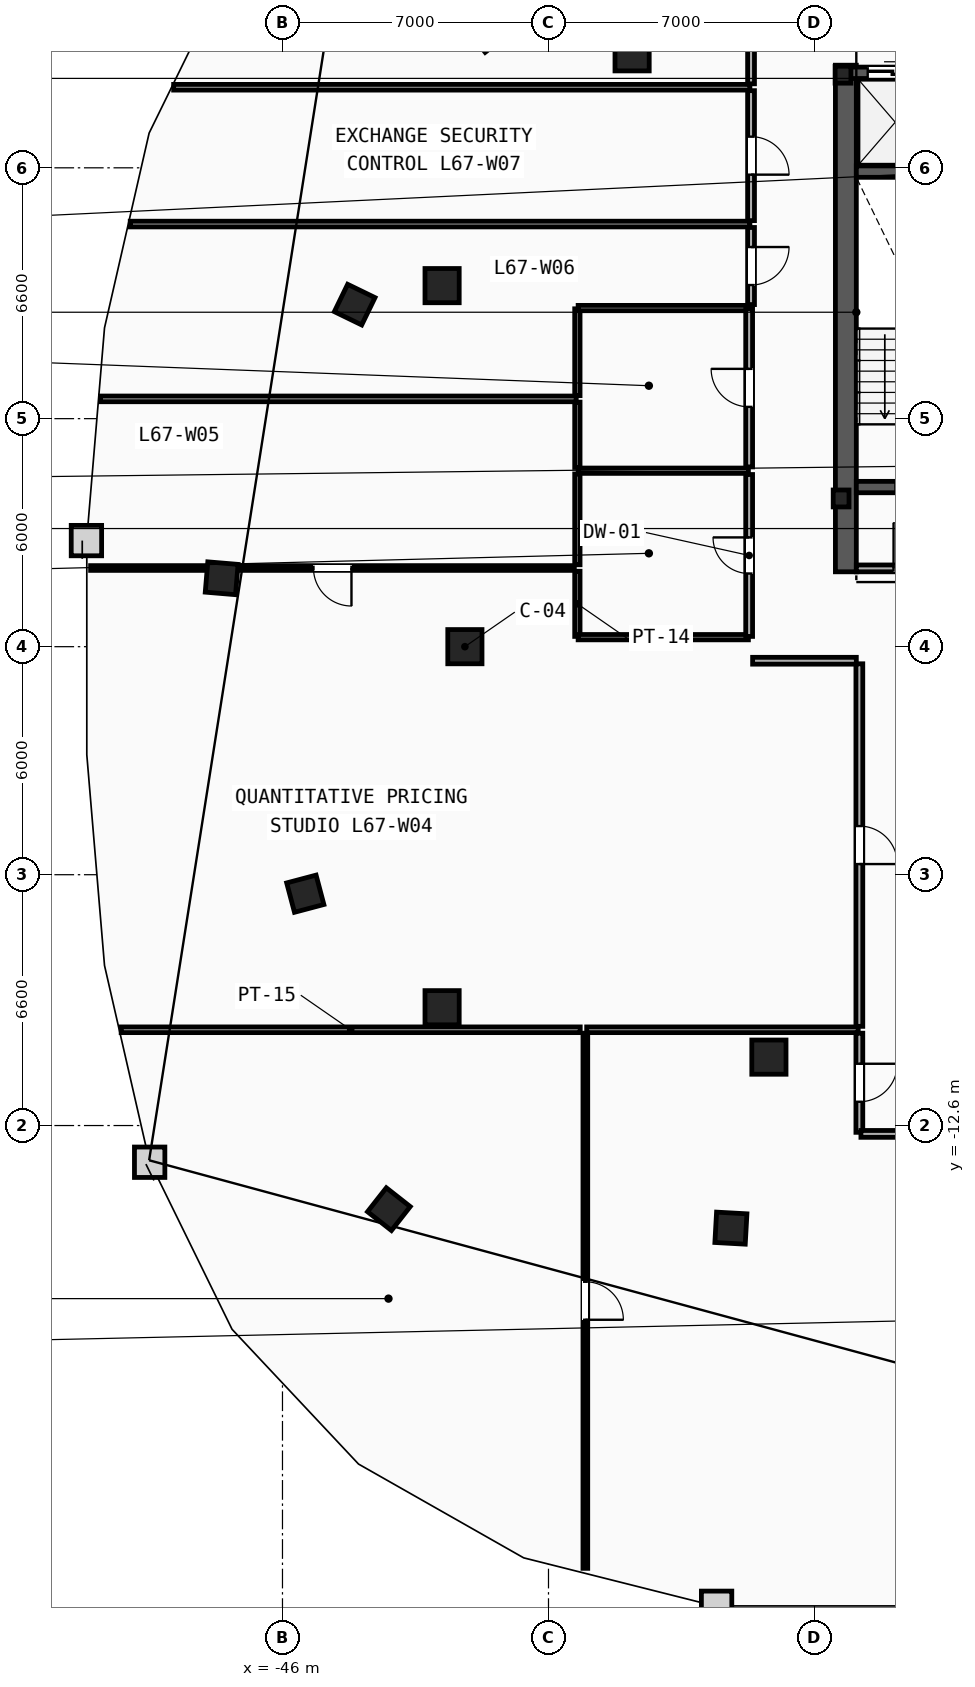
"""IFC4 building model, lengths in metres.
Left out: names, types, materials, properties, quantities, classifications, styles, units other than length and angle.
Written with IfcOpenShell. Run it as: python <this file> out.ifc"""

import sys

from ifc_helpers import new_model, si_unit, direction, frame, frame_2d, origin, origin_2d, place, context, subcontext, project, spatial, rectangle, i_section, extrude, element, fill, save


model = new_model("IFC4")
c1 = context("Model", 3, precision=1e-05, world=origin(), true_north=direction((0.0, 1.0)))
c2 = subcontext(c1, "Body", "Model", "MODEL_VIEW")
j1 = project(units=[si_unit("LENGTHUNIT", "METRE"), si_unit("PLANEANGLEUNIT", "RADIAN")], contexts=[c1])
p1 = place(None, origin())
s1 = spatial("IfcSite", under=j1, at=p1, CompositionType="ELEMENT")
p2 = place(p1, origin())
s2 = spatial("IfcBuilding", under=s1, at=p2, CompositionType="ELEMENT")
p3 = place(p2, frame((0.0, 0.0, 254.0)))
s3 = spatial("IfcBuildingStorey", under=s2, at=p3, CompositionType="ELEMENT", Elevation=254.0)
for number, where, z_axis, x_axis in (
    (1, (-31.3, 3.9, 0.0), (0.0, 0.0, 1.0), (1.0, 0.0, 0.0)),
    (2, (-31.25, 15.05, 0.0), (0.0, 0.0, 1.0), (1.0, 0.0, 0.0)),
):
    element("IfcColumn", number, at=place(p3, frame(where, z_axis=z_axis, x_axis=x_axis)), inside=s3, PredefinedType="COLUMN", context=c2, shape_type="SweptSolid", body=[
        extrude(i_section(OverallWidth=0.416, OverallDepth=0.446, WebThickness=0.039, FlangeThickness=0.063, FilletRadius=0.018, at=origin_2d()), origin(), (0.0, 0.0, 1.0), 3.6),
    ])
for number, where, z_axis, x_axis in (
    (3, (-41.2, 0.0, 0.0), (0.0, 0.0, 1.0), (1.0, 0.0, 0.0)),
    (4, (-41.8, 9.5, 0.0), (0.0, 0.0, 1.0), (1.0, 0.0, 0.0)),
    (5, (-36.8, 15.6, 0.0), (0.0, 0.0, 1.0), (1.0, 0.0, 0.0)),
    (6, (-41.8, -9.5, 0.0), (0.0, 0.0, 1.0), (1.0, 0.0, 0.0)),
    (7, (-33.2, -10.8, 0.0), (0.0, 0.0, 1.0), (1.0, 0.0, 0.0)),
):
    element("IfcColumn", number, at=place(p3, frame(where, z_axis=z_axis, x_axis=x_axis)), inside=s3, PredefinedType="COLUMN", context=c2, shape_type="SweptSolid", body=[
        extrude(rectangle(XDim=0.9, YDim=0.9, at=origin_2d()), origin(), (0.0, 0.0, 1.0), 3.6),
    ])
for number, where, z_axis, x_axis in (
    (8, (-40.6, 16.2, 0.0), (0.0, 0.0, 1.0), (-0.785, -0.619, 0.0)),
    (9, (-44.1, 9.0, 0.0), (0.0, 0.0, 1.0), (-0.437, -0.899, 0.0)),
    (10, (-47.6, 1.8, 0.0), (0.0, 0.0, 1.0), (-0.084, -0.997, 0.0)),
    (11, (-45.4, -6.5, 0.0), (0.0, 0.0, 1.0), (0.256, -0.967, 0.0)),
    (12, (-43.2, -14.8, 0.0), (0.0, 0.0, 1.0), (0.786, -0.618, 0.0)),
    (13, (-34.2, -15.3, 0.0), (0.0, 0.0, 1.0), (0.998, -0.055, 0.0)),
):
    element("IfcColumn", number, at=place(p3, frame(where, z_axis=z_axis, x_axis=x_axis)), inside=s3, PredefinedType="COLUMN", context=c2, shape_type="SweptSolid", body=[
        extrude(rectangle(XDim=0.8, YDim=0.8, at=origin_2d()), origin(), (0.0, 0.0, 1.0), 3.6),
    ])
p4 = place(p3, frame((-31.175, 1.97, 0.0), z_axis=(0.0, 0.0, 1.0), x_axis=(0.0, 1.0, 0.0)))
e14 = element("IfcWall", 14, at=p4, inside=s3, PredefinedType="SHEAR", context=c2, shape_type="SweptSolid", body=[
    extrude(rectangle(XDim=13.33, YDim=0.55, at=frame_2d((6.665, 0.0))), origin(), (0.0, 0.0, 1.0), 3.34),
])
p5 = place(p3, frame((-30.9, 4.2, 0.0), z_axis=(0.0, 0.0, 1.0), x_axis=(1.0, 0.0, 0.0)))
e15 = element("IfcWall", 15, at=p5, inside=s3, PredefinedType="SHEAR", context=c2, shape_type="SweptSolid", body=[
    extrude(rectangle(XDim=3.16, YDim=0.3, at=frame_2d((1.58, 0.0))), origin(), (0.0, 0.0, 1.0), 3.34),
])
p6 = place(p5, frame((1.03, 0.0, 0.0)))
e16 = element("IfcOpeningElement", 16, at=p6, cuts=e15, PredefinedType="OPENING", context=c2, shape_type="SweptSolid", body=[
    extrude(rectangle(XDim=1.1, YDim=2.15, at=frame_2d((0.55, 1.075))), frame((0.0, 0.16, 0.0), z_axis=(0.0, -1.0, 0.0), x_axis=(1.0, 0.0, 0.0)), (0.0, 0.0, 1.0), 0.32),
])
p7 = place(p3, frame((-30.9, 12.5, 0.0), z_axis=(0.0, 0.0, 1.0), x_axis=(1.0, 0.0, 0.0)))
e17 = element("IfcWall", 17, at=p7, inside=s3, PredefinedType="SHEAR", context=c2, shape_type="SweptSolid", body=[
    extrude(rectangle(XDim=3.16, YDim=0.3, at=frame_2d((1.58, 0.0))), origin(), (0.0, 0.0, 1.0), 3.34),
])
p8 = place(p3, frame((-30.9, 2.06, 0.0), z_axis=(0.0, 0.0, 1.0), x_axis=(1.0, 0.0, 0.0)))
e18 = element("IfcWall", 18, at=p8, inside=s3, PredefinedType="PARTITIONING", context=c2, shape_type="SweptSolid", body=[
    extrude(rectangle(XDim=3.16, YDim=0.18, at=frame_2d((1.58, 0.0))), origin(), (0.0, 0.0, 1.0), 3.34),
])
p9 = place(p8, frame((0.98, 0.0, 0.0)))
e19 = element("IfcOpeningElement", 19, at=p9, cuts=e18, PredefinedType="OPENING", context=c2, shape_type="SweptSolid", body=[
    extrude(rectangle(XDim=1.2, YDim=2.15, at=frame_2d((0.6, 1.075))), frame((0.0, 0.1, 0.0), z_axis=(0.0, -1.0, 0.0), x_axis=(1.0, 0.0, 0.0)), (0.0, 0.0, 1.0), 0.2),
])
p10 = place(p3, frame((-31.2, 15.1, 0.0), z_axis=(0.0, 0.0, 1.0), x_axis=(1.0, 0.0, 0.0)))
e20 = element("IfcWall", 20, at=p10, inside=s3, PredefinedType="SHEAR", context=c2, shape_type="SweptSolid", body=[
    extrude(rectangle(XDim=2.5, YDim=0.3, at=frame_2d((1.25, 0.0))), origin(), (0.0, 0.0, 1.0), 3.34),
])
p11 = place(p10, frame((0.6, 0.0, 0.0)))
e21 = element("IfcOpeningElement", 21, at=p11, cuts=e20, PredefinedType="OPENING", context=c2, shape_type="SweptSolid", body=[
    extrude(rectangle(XDim=1.3, YDim=2.2, at=frame_2d((0.65, 1.1))), frame((0.0, 0.16, 0.0), z_axis=(0.0, -1.0, 0.0), x_axis=(1.0, 0.0, 0.0)), (0.0, 0.0, 1.0), 0.32),
])
p12 = place(p3, frame((-38.24, 0.27, 0.0), z_axis=(0.0, 0.0, 1.0), x_axis=(0.0, 1.0, 0.0)))
e22 = element("IfcWall", 22, at=p12, inside=s3, PredefinedType="PARTITIONING", context=c2, shape_type="SweptSolid", body=[
    extrude(rectangle(XDim=1.715, YDim=0.14, at=frame_2d((0.857, 0.0))), origin(), (0.0, 0.0, 1.0), 3.34),
])
p13 = place(p3, frame((-38.24, 2.155, 0.0), z_axis=(0.0, 0.0, 1.0), x_axis=(0.0, 1.0, 0.0)))
e23 = element("IfcWall", 23, at=p13, inside=s3, PredefinedType="PARTITIONING", context=c2, shape_type="SweptSolid", body=[
    extrude(rectangle(XDim=2.39, YDim=0.14, at=frame_2d((1.195, 0.0))), origin(), (0.0, 0.0, 1.0), 3.34),
])
p14 = place(p3, frame((-38.24, 4.715, 0.0), z_axis=(0.0, 0.0, 1.0), x_axis=(0.0, 1.0, 0.0)))
e24 = element("IfcWall", 24, at=p14, inside=s3, PredefinedType="PARTITIONING", context=c2, shape_type="SweptSolid", body=[
    extrude(rectangle(XDim=1.72, YDim=0.14, at=frame_2d((0.86, 0.0))), origin(), (0.0, 0.0, 1.0), 3.34),
])
p15 = place(p3, frame((-38.24, 6.605, 0.0), z_axis=(0.0, 0.0, 1.0), x_axis=(0.0, 1.0, 0.0)))
e25 = element("IfcWall", 25, at=p15, inside=s3, PredefinedType="PARTITIONING", context=c2, shape_type="SweptSolid", body=[
    extrude(rectangle(XDim=2.285, YDim=0.14, at=frame_2d((1.143, 0.0))), origin(), (0.0, 0.0, 1.0), 3.34),
])
for number, where, z_axis, x_axis in (
    (26, (-38.22, 0.25, 0.0), (0.0, 0.0, 1.0), (1.0, 0.0, 0.0)),
    (27, (-38.22, 4.63, 0.0), (0.0, 0.0, 1.0), (1.0, 0.0, 0.0)),
    (28, (-38.22, 8.91, 0.0), (0.0, 0.0, 1.0), (1.0, 0.0, 0.0)),
):
    element("IfcWall", number, at=place(p3, frame(where, z_axis=z_axis, x_axis=x_axis)), inside=s3, PredefinedType="PARTITIONING", context=c2, shape_type="SweptSolid", body=[
        extrude(rectangle(XDim=4.48, YDim=0.14, at=frame_2d((2.24, 0.0))), origin(), (0.0, 0.0, 1.0), 3.34),
    ])
p16 = place(p3, frame((-33.72, 0.27, 0.0), z_axis=(0.0, 0.0, 1.0), x_axis=(0.0, 1.0, 0.0)))
e29 = element("IfcWall", 29, at=p16, inside=s3, PredefinedType="PARTITIONING", context=c2, shape_type="SweptSolid", body=[
    extrude(rectangle(XDim=4.26, YDim=0.18, at=frame_2d((2.13, 0.0))), origin(), (0.0, 0.0, 1.0), 3.34),
])
p17 = place(p16, frame((1.655, 0.0, 0.0)))
e30 = element("IfcOpeningElement", 30, at=p17, cuts=e29, PredefinedType="OPENING", context=c2, shape_type="SweptSolid", body=[
    extrude(rectangle(XDim=0.95, YDim=2.1, at=frame_2d((0.475, 1.05))), frame((0.0, 0.1, 0.0), z_axis=(0.0, -1.0, 0.0), x_axis=(1.0, 0.0, 0.0)), (0.0, 0.0, 1.0), 0.2),
])
p18 = place(p3, frame((-33.72, 4.73, 0.0), z_axis=(0.0, 0.0, 1.0), x_axis=(0.0, 1.0, 0.0)))
e31 = element("IfcWall", 31, at=p18, inside=s3, PredefinedType="PARTITIONING", context=c2, shape_type="SweptSolid", body=[
    extrude(rectangle(XDim=4.16, YDim=0.18, at=frame_2d((2.08, 0.0))), origin(), (0.0, 0.0, 1.0), 3.34),
])
p19 = place(p18, frame((1.58, 0.0, 0.0)))
e32 = element("IfcOpeningElement", 32, at=p19, cuts=e31, PredefinedType="OPENING", context=c2, shape_type="SweptSolid", body=[
    extrude(rectangle(XDim=1.0, YDim=2.15, at=frame_2d((0.5, 1.075))), frame((0.0, 0.1, 0.0), z_axis=(0.0, -1.0, 0.0), x_axis=(1.0, 0.0, 0.0)), (0.0, 0.0, 1.0), 0.2),
])
p20 = place(p3, frame((-50.245, -10.08, 0.0), z_axis=(0.0, 0.0, 1.0), x_axis=(1.0, 0.0, 0.0)))
e33 = element("IfcWall", 33, at=p20, inside=s3, PredefinedType="PARTITIONING", context=c2, shape_type="SweptSolid", body=[
    extrude(rectangle(XDim=12.08, YDim=0.15, at=frame_2d((6.04, 0.0))), origin(), (0.0, 0.0, 1.0), 2.724),
])
p21 = place(p3, frame((-37.995, -10.08, 0.0), z_axis=(0.0, 0.0, 1.0), x_axis=(1.0, 0.0, 0.0)))
e34 = element("IfcWall", 34, at=p21, inside=s3, PredefinedType="PARTITIONING", context=c2, shape_type="SweptSolid", body=[
    extrude(rectangle(XDim=7.145, YDim=0.15, at=frame_2d((3.573, 0.0))), origin(), (0.0, 0.0, 1.0), 2.724),
])
p22 = place(p3, frame((-50.79, 6.52, 0.0), z_axis=(0.0, 0.0, 1.0), x_axis=(1.0, 0.0, 0.0)))
e35 = element("IfcWall", 35, at=p22, inside=s3, PredefinedType="PARTITIONING", context=c2, shape_type="SweptSolid", body=[
    extrude(rectangle(XDim=12.52, YDim=0.15, at=frame_2d((6.26, 0.0))), origin(), (0.0, 0.0, 1.0), 3.34),
])
p23 = place(p3, frame((-50.007, 11.12, 0.0), z_axis=(0.0, 0.0, 1.0), x_axis=(1.0, 0.0, 0.0)))
e36 = element("IfcWall", 36, at=p23, inside=s3, PredefinedType="PARTITIONING", context=c2, shape_type="SweptSolid", body=[
    extrude(rectangle(XDim=16.307, YDim=0.15, at=frame_2d((8.153, 0.0))), origin(), (0.0, 0.0, 1.0), 3.34),
])
p24 = place(p3, frame((-48.864, 14.72, 0.0), z_axis=(0.0, 0.0, 1.0), x_axis=(1.0, 0.0, 0.0)))
e37 = element("IfcWall", 37, at=p24, inside=s3, PredefinedType="PARTITIONING", context=c2, shape_type="SweptSolid", body=[
    extrude(rectangle(XDim=15.164, YDim=0.15, at=frame_2d((7.582, 0.0))), origin(), (0.0, 0.0, 1.0), 3.34),
])
p25 = place(p3, frame((-30.82, -10.17, 0.0), z_axis=(0.0, 0.0, 1.0), x_axis=(0.0, -1.0, 0.0)))
e38 = element("IfcWall", 38, at=p25, inside=s3, PredefinedType="PARTITIONING", context=c2, shape_type="SweptSolid", body=[
    extrude(rectangle(XDim=2.609, YDim=0.18, at=frame_2d((1.304, 0.0))), origin(), (0.0, 0.0, 1.0), 3.34),
])
p26 = place(p25, frame((0.804, 0.0, 0.0)))
e39 = element("IfcOpeningElement", 39, at=p26, cuts=e38, PredefinedType="OPENING", context=c2, shape_type="SweptSolid", body=[
    extrude(rectangle(XDim=1.0, YDim=2.15, at=frame_2d((0.5, 1.075))), frame((0.0, 0.1, 0.0), z_axis=(0.0, -1.0, 0.0), x_axis=(1.0, 0.0, 0.0)), (0.0, 0.0, 1.0), 0.2),
])
p27 = place(p3, frame((-30.779, -12.82, 0.0), z_axis=(0.0, 0.0, 1.0), x_axis=(1.0, 0.0, 0.0)))
e40 = element("IfcWall", 40, at=p27, inside=s3, PredefinedType="PARTITIONING", context=c2, shape_type="SweptSolid", body=[
    extrude(rectangle(XDim=2.357, YDim=0.18, at=frame_2d((1.179, 0.0))), origin(), (0.0, 0.0, 1.0), 3.34),
])
p28 = place(p3, frame((-30.82, -0.45, 0.0), z_axis=(0.0, 0.0, 1.0), x_axis=(0.0, -1.0, 0.0)))
e41 = element("IfcWall", 41, at=p28, inside=s3, PredefinedType="PARTITIONING", context=c2, shape_type="SweptSolid", body=[
    extrude(rectangle(XDim=9.54, YDim=0.18, at=frame_2d((4.77, 0.0))), origin(), (0.0, 0.0, 1.0), 3.34),
])
p29 = place(p28, frame((4.27, 0.0, 0.0)))
e42 = element("IfcOpeningElement", 42, at=p29, cuts=e41, PredefinedType="OPENING", context=c2, shape_type="SweptSolid", body=[
    extrude(rectangle(XDim=1.0, YDim=2.15, at=frame_2d((0.5, 1.075))), frame((0.0, 0.1, 0.0), z_axis=(0.0, -1.0, 0.0), x_axis=(1.0, 0.0, 0.0)), (0.0, 0.0, 1.0), 0.2),
])
p30 = place(p3, frame((-33.628, -0.37, 0.0), z_axis=(0.0, 0.0, 1.0), x_axis=(1.0, 0.0, 0.0)))
e43 = element("IfcWall", 43, at=p30, inside=s3, PredefinedType="PARTITIONING", context=c2, shape_type="SweptSolid", body=[
    extrude(rectangle(XDim=2.729, YDim=0.18, at=frame_2d((1.364, 0.0))), origin(), (0.0, 0.0, 1.0), 3.34),
])
p31 = place(p3, frame((-33.67, 11.03, 0.0), z_axis=(0.0, 0.0, 1.0), x_axis=(0.0, -1.0, 0.0)))
e44 = element("IfcWall", 44, at=p31, inside=s3, PredefinedType="PARTITIONING", context=c2, shape_type="SweptSolid", body=[
    extrude(rectangle(XDim=2.029, YDim=0.18, at=frame_2d((1.014, 0.0))), origin(), (0.0, 0.0, 1.0), 3.34),
])
p32 = place(p31, frame((0.514, 0.0, 0.0)))
e45 = element("IfcOpeningElement", 45, at=p32, cuts=e44, PredefinedType="OPENING", context=c2, shape_type="SweptSolid", body=[
    extrude(rectangle(XDim=1.0, YDim=2.15, at=frame_2d((0.5, 1.075))), frame((0.0, 0.1, 0.0), z_axis=(0.0, -1.0, 0.0), x_axis=(1.0, 0.0, 0.0)), (0.0, 0.0, 1.0), 0.2),
])
p33 = place(p3, frame((-33.67, 14.63, 0.0), z_axis=(0.0, 0.0, 1.0), x_axis=(0.0, -1.0, 0.0)))
e46 = element("IfcWall", 46, at=p33, inside=s3, PredefinedType="PARTITIONING", context=c2, shape_type="SweptSolid", body=[
    extrude(rectangle(XDim=3.42, YDim=0.18, at=frame_2d((1.71, 0.0))), origin(), (0.0, 0.0, 1.0), 3.34),
])
p34 = place(p33, frame((1.21, 0.0, 0.0)))
e47 = element("IfcOpeningElement", 47, at=p34, cuts=e46, PredefinedType="OPENING", context=c2, shape_type="SweptSolid", body=[
    extrude(rectangle(XDim=1.0, YDim=2.15, at=frame_2d((0.5, 1.075))), frame((0.0, 0.1, 0.0), z_axis=(0.0, -1.0, 0.0), x_axis=(1.0, 0.0, 0.0)), (0.0, 0.0, 1.0), 0.2),
])
p35 = place(p3, frame((-33.67, 17.428, 0.0), z_axis=(0.0, 0.0, 1.0), x_axis=(0.0, -1.0, 0.0)))
e48 = element("IfcWall", 48, at=p35, inside=s3, PredefinedType="PARTITIONING", context=c2, shape_type="SweptSolid", body=[
    extrude(rectangle(XDim=2.618, YDim=0.18, at=frame_2d((1.309, 0.0))), origin(), (0.0, 0.0, 1.0), 3.34),
])
p36 = place(p3, frame((-38.03, -10.17, 0.0), z_axis=(0.0, 0.0, 1.0), x_axis=(0.0, -1.0, 0.0)))
e49 = element("IfcWall", 49, at=p36, inside=s3, PredefinedType="PARTITIONING", context=c2, shape_type="SweptSolid", body=[
    extrude(rectangle(XDim=14.081, YDim=0.125, at=frame_2d((7.041, 0.0))), origin(), (0.0, 0.0, 1.0), 3.34),
])
p37 = place(p36, frame((6.541, 0.0, 0.0)))
e50 = element("IfcOpeningElement", 50, at=p37, cuts=e49, PredefinedType="OPENING", context=c2, shape_type="SweptSolid", body=[
    extrude(rectangle(XDim=1.0, YDim=2.15, at=frame_2d((0.5, 1.075))), frame((0.0, 0.073, 0.0), z_axis=(0.0, -1.0, 0.0), x_axis=(1.0, 0.0, 0.0)), (0.0, 0.0, 1.0), 0.145),
])
p38 = place(p3, frame((-38.32, 2.07, 0.0), z_axis=(0.0, 0.0, 1.0), x_axis=(-1.0, 0.0, 0.0)))
e51 = element("IfcWall", 51, at=p38, inside=s3, PredefinedType="PARTITIONING", context=c2, shape_type="SweptSolid", body=[
    extrude(rectangle(XDim=12.729, YDim=0.125, at=frame_2d((6.365, 0.0))), origin(), (0.0, 0.0, 1.0), 3.34),
])
p39 = place(p38, frame((5.865, 0.0, 0.0)))
e52 = element("IfcOpeningElement", 52, at=p39, cuts=e51, PredefinedType="OPENING", context=c2, shape_type="SweptSolid", body=[
    extrude(rectangle(XDim=1.0, YDim=2.15, at=frame_2d((0.5, 1.075))), frame((0.0, 0.073, 0.0), z_axis=(0.0, -1.0, 0.0), x_axis=(1.0, 0.0, 0.0)), (0.0, 0.0, 1.0), 0.145),
])
p40 = place(p9, origin())
e53 = element("IfcDoor", 53, at=p40, inside=s3, OperationType="SINGLE_SWING_LEFT", PredefinedType="DOOR", context=c2, shape_type="SweptSolid", body=[
    extrude(rectangle(XDim=1.2, YDim=2.15, at=frame_2d((0.6, 1.075))), frame((0.0, 0.025, 0.0), z_axis=(0.0, -1.0, 0.0), x_axis=(1.0, 0.0, 0.0)), (0.0, 0.0, 1.0), 0.05),
])
fill(e19, e53)
p41 = place(p11, origin())
e54 = element("IfcDoor", 54, at=p41, inside=s3, OperationType="SLIDING_TO_LEFT", PredefinedType="TRAPDOOR", context=c2, shape_type="SweptSolid", body=[
    extrude(rectangle(XDim=1.3, YDim=2.2, at=frame_2d((0.65, 1.1))), frame((0.0, 0.025, 0.0), z_axis=(0.0, -1.0, 0.0), x_axis=(1.0, 0.0, 0.0)), (0.0, 0.0, 1.0), 0.05),
])
fill(e21, e54)
p42 = place(p37, origin())
e55 = element("IfcDoor", 55, at=p42, inside=s3, OperationType="SINGLE_SWING_RIGHT", PredefinedType="DOOR", context=c2, shape_type="SweptSolid", body=[
    extrude(rectangle(XDim=1.0, YDim=2.15, at=frame_2d((0.5, 1.075))), frame((0.0, 0.025, 0.0), z_axis=(0.0, -1.0, 0.0), x_axis=(1.0, 0.0, 0.0)), (0.0, 0.0, 1.0), 0.05),
])
fill(e50, e55)
p43 = place(p39, origin())
e56 = element("IfcDoor", 56, at=p43, inside=s3, OperationType="SINGLE_SWING_LEFT", PredefinedType="DOOR", context=c2, shape_type="SweptSolid", body=[
    extrude(rectangle(XDim=1.0, YDim=2.15, at=frame_2d((0.5, 1.075))), frame((0.0, 0.025, 0.0), z_axis=(0.0, -1.0, 0.0), x_axis=(1.0, 0.0, 0.0)), (0.0, 0.0, 1.0), 0.05),
])
fill(e52, e56)
p44 = place(p29, origin())
e57 = element("IfcDoor", 57, at=p44, inside=s3, OperationType="SINGLE_SWING_RIGHT", PredefinedType="DOOR", context=c2, shape_type="SweptSolid", body=[
    extrude(rectangle(XDim=1.0, YDim=2.15, at=frame_2d((0.5, 1.075))), frame((0.0, 0.025, 0.0), z_axis=(0.0, -1.0, 0.0), x_axis=(1.0, 0.0, 0.0)), (0.0, 0.0, 1.0), 0.05),
])
fill(e42, e57)
p45 = place(p17, origin())
e58 = element("IfcDoor", 58, at=p45, inside=s3, OperationType="SINGLE_SWING_RIGHT", PredefinedType="DOOR", context=c2, shape_type="SweptSolid", body=[
    extrude(rectangle(XDim=0.95, YDim=2.1, at=frame_2d((0.475, 1.05))), frame((0.0, 0.025, 0.0), z_axis=(0.0, -1.0, 0.0), x_axis=(1.0, 0.0, 0.0)), (0.0, 0.0, 1.0), 0.05),
])
fill(e30, e58)
p46 = place(p19, origin())
e59 = element("IfcDoor", 59, at=p46, inside=s3, OperationType="SINGLE_SWING_RIGHT", PredefinedType="DOOR", context=c2, shape_type="SweptSolid", body=[
    extrude(rectangle(XDim=1.0, YDim=2.15, at=frame_2d((0.5, 1.075))), frame((0.0, 0.025, 0.0), z_axis=(0.0, -1.0, 0.0), x_axis=(1.0, 0.0, 0.0)), (0.0, 0.0, 1.0), 0.05),
])
fill(e32, e59)
p47 = place(p34, origin())
e60 = element("IfcDoor", 60, at=p47, inside=s3, OperationType="SINGLE_SWING_RIGHT", PredefinedType="DOOR", context=c2, shape_type="SweptSolid", body=[
    extrude(rectangle(XDim=1.0, YDim=2.15, at=frame_2d((0.5, 1.075))), frame((0.0, 0.025, 0.0), z_axis=(0.0, -1.0, 0.0), x_axis=(1.0, 0.0, 0.0)), (0.0, 0.0, 1.0), 0.05),
])
fill(e47, e60)
p48 = place(p26, origin())
e61 = element("IfcDoor", 61, at=p48, inside=s3, OperationType="SINGLE_SWING_LEFT", PredefinedType="DOOR", context=c2, shape_type="SweptSolid", body=[
    extrude(rectangle(XDim=1.0, YDim=2.15, at=frame_2d((0.5, 1.075))), frame((0.0, 0.025, 0.0), z_axis=(0.0, -1.0, 0.0), x_axis=(1.0, 0.0, 0.0)), (0.0, 0.0, 1.0), 0.05),
])
fill(e39, e61)
p49 = place(p32, origin())
e62 = element("IfcDoor", 62, at=p49, inside=s3, OperationType="SINGLE_SWING_LEFT", PredefinedType="DOOR", context=c2, shape_type="SweptSolid", body=[
    extrude(rectangle(XDim=1.0, YDim=2.15, at=frame_2d((0.5, 1.075))), frame((0.0, 0.025, 0.0), z_axis=(0.0, -1.0, 0.0), x_axis=(1.0, 0.0, 0.0)), (0.0, 0.0, 1.0), 0.05),
])
fill(e45, e62)
save(model, sys.argv[1])
